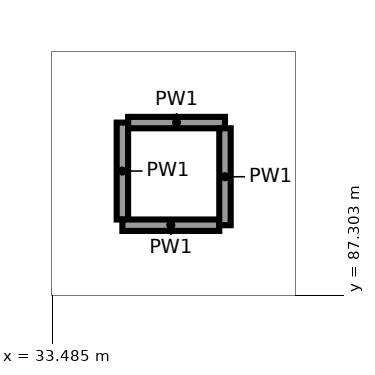
"""IFC4 building model, lengths in metres.
Left out: names, types, materials, properties, quantities, classifications, styles, units other than length and angle.
Written with IfcOpenShell. Run it as: python <this file> out.ifc"""

import sys

from ifc_helpers import new_model, si_unit, direction, frame, frame_2d, origin, origin_2d, place, context, subcontext, project, spatial, rectangle, circle, extrude, element, save


model = new_model("IFC4")
c1 = context("Model", 3, precision=1e-05, world=origin(), true_north=direction((0.0, 1.0)))
c2 = subcontext(c1, "Body", "Model", "MODEL_VIEW")
j1 = project(units=[si_unit("LENGTHUNIT", "METRE"), si_unit("PLANEANGLEUNIT", "RADIAN")], contexts=[c1])
p1 = place(None, origin())
s1 = spatial("IfcSite", under=j1, at=p1, CompositionType="ELEMENT")
p2 = place(p1, origin())
s2 = spatial("IfcBuilding", under=s1, at=p2, CompositionType="ELEMENT")
p3 = place(p2, frame((0.0, 0.0, 12.0)))
s3 = spatial("IfcBuildingStorey", under=s2, at=p3, CompositionType="ELEMENT", Elevation=12.0)
p4 = place(p3, frame((32.944, 90.551, 0.0), z_axis=(0.0, 0.0, 1.0), x_axis=(1.0, 0.0, 0.0)))
e1 = element("IfcColumn", 1, at=p4, inside=s3, PredefinedType="COLUMN", context=c2, shape_type="SweptSolid", body=[
    extrude(circle(Radius=0.55, at=origin_2d()), origin(), (0.0, 0.0, 1.0), 6.0),
])
p5 = place(p3, frame((35.758, 89.576, 0.0), z_axis=(0.0, 0.0, 1.0), x_axis=(-1.0, 0.0, 0.0)))
e2 = element("IfcWall", 2, at=p5, inside=s3, PredefinedType="PARTITIONING", context=c2, shape_type="SweptSolid", body=[
    extrude(rectangle(XDim=1.275, YDim=0.15, at=frame_2d((0.637, 0.0))), origin(), (0.0, 0.0, 1.0), 5.65),
])
for number, where, z_axis, x_axis in (
    (3, (34.408, 89.576, 0.0), (0.0, 0.0, 1.0), (0.0, -1.0, 0.0)),
    (4, (34.408, 88.226, 0.0), (0.0, 0.0, 1.0), (1.0, 0.0, 0.0)),
    (5, (35.758, 88.226, 0.0), (0.0, 0.0, 1.0), (0.0, 1.0, 0.0)),
):
    element("IfcWall", number, at=place(p3, frame(where, z_axis=z_axis, x_axis=x_axis)), inside=s3, PredefinedType="PARTITIONING", context=c2, shape_type="SweptSolid", body=[
        extrude(rectangle(XDim=1.275, YDim=0.15, at=frame_2d((0.638, 0.0))), origin(), (0.0, 0.0, 1.0), 5.65),
    ])
save(model, sys.argv[1])
